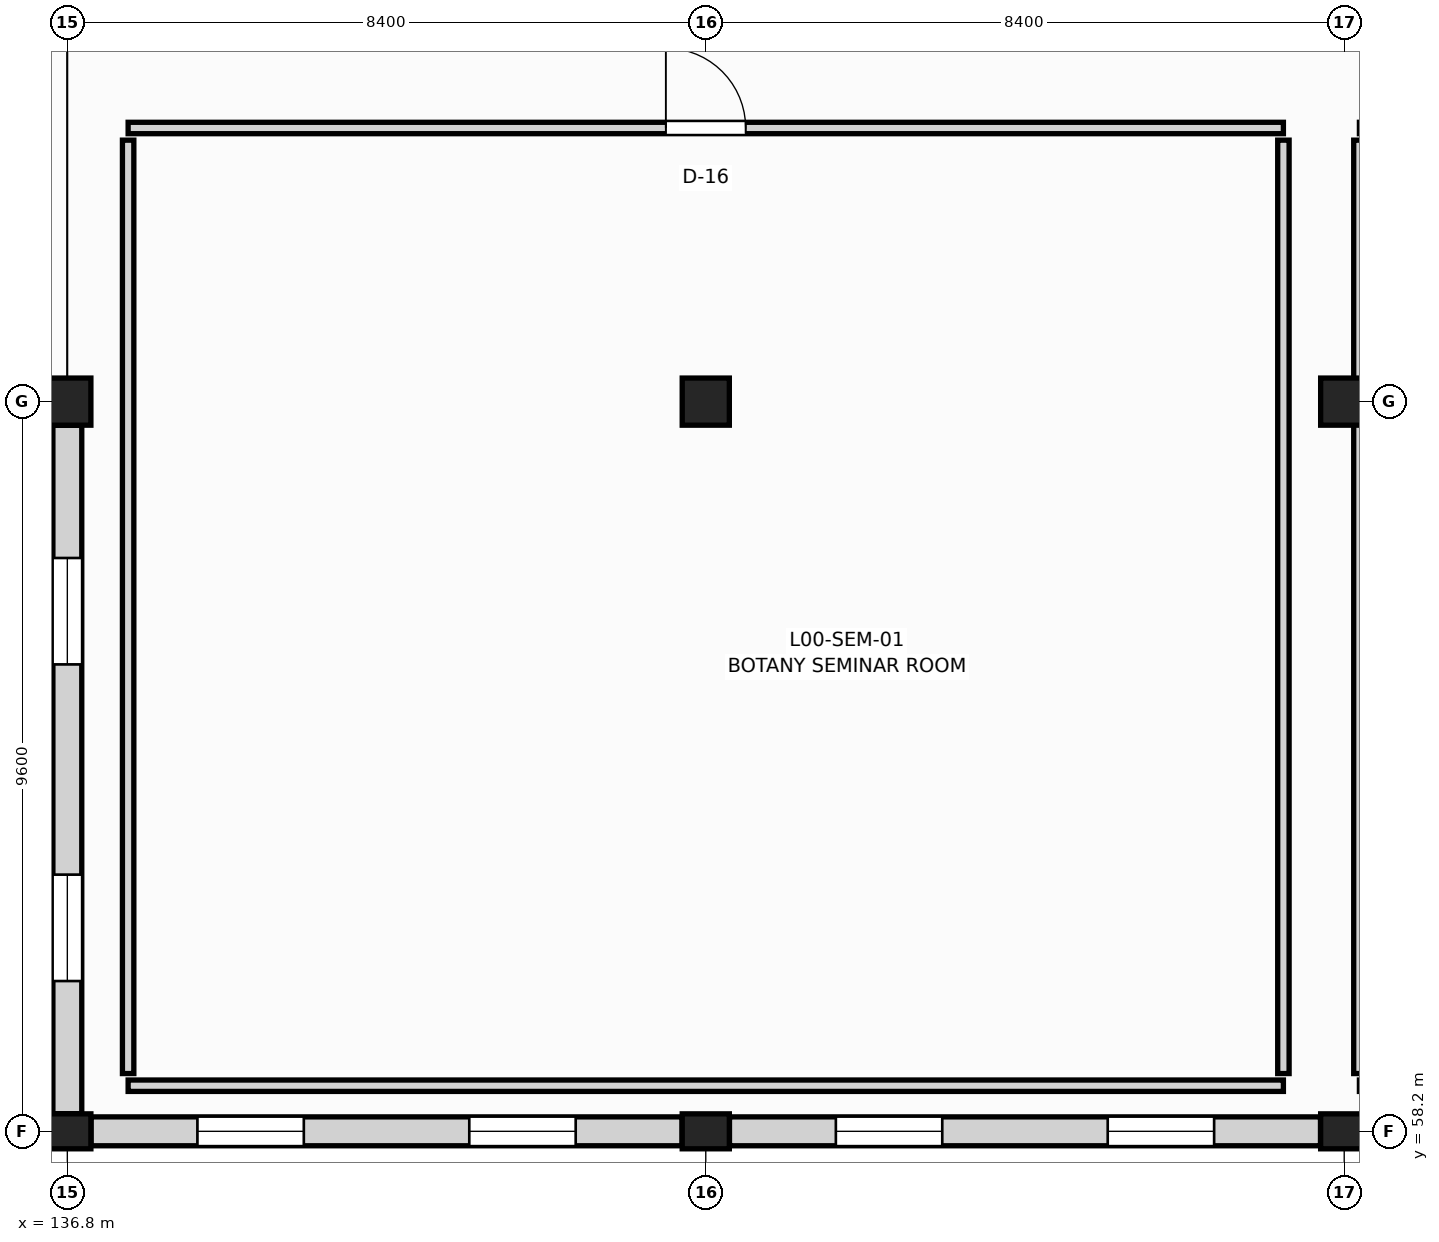
"""IFC4 building model, lengths in metres.
Left out: names, types, materials, properties, quantities, classifications, styles, units other than length and angle.
Written with IfcOpenShell. Run it as: python <this file> out.ifc"""

import sys

from ifc_helpers import new_model, si_unit, direction, frame, frame_2d, origin, origin_2d, place, context, subcontext, project, spatial, rectangle, extrude, element, fill, save


model = new_model("IFC4")
c1 = context("Model", 3, precision=1e-05, world=origin(), true_north=direction((0.0, 1.0)))
c2 = subcontext(c1, "Body", "Model", "MODEL_VIEW")
j1 = project(units=[si_unit("LENGTHUNIT", "METRE"), si_unit("PLANEANGLEUNIT", "RADIAN")], contexts=[c1])
p1 = place(None, origin())
s1 = spatial("IfcSite", under=j1, at=p1, CompositionType="ELEMENT")
p2 = place(p1, origin())
s2 = spatial("IfcBuilding", under=s1, at=p2, CompositionType="ELEMENT")
p3 = place(p2, origin())
s3 = spatial("IfcBuildingStorey", under=s2, at=p3, CompositionType="ELEMENT", Elevation=0.0)
p4 = place(p3, frame((136.8, 58.2, 0.0), z_axis=(0.0, 0.0, 1.0), x_axis=(1.0, 0.0, 0.0)))
e1 = element("IfcColumn", 1, at=p4, inside=s3, PredefinedType="COLUMN", context=c2, shape_type="SweptSolid", body=[
    extrude(rectangle(XDim=0.62, YDim=0.46, at=origin_2d()), origin(), (0.0, 0.0, 1.0), 5.08),
])
p5 = place(p3, frame((136.8, 67.8, 0.0), z_axis=(0.0, 0.0, 1.0), x_axis=(1.0, 0.0, 0.0)))
e2 = element("IfcColumn", 2, at=p5, inside=s3, PredefinedType="COLUMN", context=c2, shape_type="SweptSolid", body=[
    extrude(rectangle(XDim=0.62, YDim=0.62, at=origin_2d()), origin(), (0.0, 0.0, 1.0), 5.08),
])
p6 = place(p3, frame((145.2, 58.2, 0.0), z_axis=(0.0, 0.0, 1.0), x_axis=(1.0, 0.0, 0.0)))
e3 = element("IfcColumn", 3, at=p6, inside=s3, PredefinedType="COLUMN", context=c2, shape_type="SweptSolid", body=[
    extrude(rectangle(XDim=0.62, YDim=0.46, at=origin_2d()), origin(), (0.0, 0.0, 1.0), 5.08),
])
p7 = place(p3, frame((145.2, 67.8, 0.0), z_axis=(0.0, 0.0, 1.0), x_axis=(1.0, 0.0, 0.0)))
e4 = element("IfcColumn", 4, at=p7, inside=s3, PredefinedType="COLUMN", context=c2, shape_type="SweptSolid", body=[
    extrude(rectangle(XDim=0.62, YDim=0.62, at=origin_2d()), origin(), (0.0, 0.0, 1.0), 5.08),
])
p8 = place(p3, frame((153.6, 58.2, 0.0), z_axis=(0.0, 0.0, 1.0), x_axis=(1.0, 0.0, 0.0)))
e5 = element("IfcColumn", 5, at=p8, inside=s3, PredefinedType="COLUMN", context=c2, shape_type="SweptSolid", body=[
    extrude(rectangle(XDim=0.62, YDim=0.46, at=origin_2d()), origin(), (0.0, 0.0, 1.0), 5.08),
])
p9 = place(p3, frame((153.6, 67.8, 0.0), z_axis=(0.0, 0.0, 1.0), x_axis=(1.0, 0.0, 0.0)))
e6 = element("IfcColumn", 6, at=p9, inside=s3, PredefinedType="COLUMN", context=c2, shape_type="SweptSolid", body=[
    extrude(rectangle(XDim=0.62, YDim=0.62, at=origin_2d()), origin(), (0.0, 0.0, 1.0), 5.08),
])
p10 = place(p3, frame((137.112, 58.2, 0.0), z_axis=(0.0, 0.0, 1.0), x_axis=(1.0, 0.0, 0.0)))
e7 = element("IfcWall", 7, at=p10, inside=s3, PredefinedType="SOLIDWALL", context=c2, shape_type="SweptSolid", body=[
    extrude(rectangle(XDim=7.776, YDim=0.38, at=frame_2d((3.888, 0.0))), origin(), (0.0, 0.0, 1.0), 4.28),
])
p11 = place(p10, frame((1.399, 0.0, 0.85)))
e8 = element("IfcOpeningElement", 8, at=p11, cuts=e7, PredefinedType="OPENING", context=c2, shape_type="SweptSolid", body=[
    extrude(rectangle(XDim=1.4, YDim=1.65, at=frame_2d((0.7, 0.825))), frame((0.0, 0.2, 0.0), z_axis=(0.0, -1.0, 0.0), x_axis=(1.0, 0.0, 0.0)), (0.0, 0.0, 1.0), 0.4),
])
p12 = place(p10, frame((4.977, 0.0, 0.85)))
e9 = element("IfcOpeningElement", 9, at=p12, cuts=e7, PredefinedType="OPENING", context=c2, shape_type="SweptSolid", body=[
    extrude(rectangle(XDim=1.4, YDim=1.65, at=frame_2d((0.7, 0.825))), frame((0.0, 0.2, 0.0), z_axis=(0.0, -1.0, 0.0), x_axis=(1.0, 0.0, 0.0)), (0.0, 0.0, 1.0), 0.4),
])
p13 = place(p3, frame((145.512, 58.2, 0.0), z_axis=(0.0, 0.0, 1.0), x_axis=(1.0, 0.0, 0.0)))
e10 = element("IfcWall", 10, at=p13, inside=s3, PredefinedType="SOLIDWALL", context=c2, shape_type="SweptSolid", body=[
    extrude(rectangle(XDim=7.776, YDim=0.38, at=frame_2d((3.888, 0.0))), origin(), (0.0, 0.0, 1.0), 4.28),
])
p14 = place(p13, frame((1.399, 0.0, 0.85)))
e11 = element("IfcOpeningElement", 11, at=p14, cuts=e10, PredefinedType="OPENING", context=c2, shape_type="SweptSolid", body=[
    extrude(rectangle(XDim=1.4, YDim=1.65, at=frame_2d((0.7, 0.825))), frame((0.0, 0.2, 0.0), z_axis=(0.0, -1.0, 0.0), x_axis=(1.0, 0.0, 0.0)), (0.0, 0.0, 1.0), 0.4),
])
p15 = place(p13, frame((4.977, 0.0, 0.85)))
e12 = element("IfcOpeningElement", 12, at=p15, cuts=e10, PredefinedType="OPENING", context=c2, shape_type="SweptSolid", body=[
    extrude(rectangle(XDim=1.4, YDim=1.65, at=frame_2d((0.7, 0.825))), frame((0.0, 0.2, 0.0), z_axis=(0.0, -1.0, 0.0), x_axis=(1.0, 0.0, 0.0)), (0.0, 0.0, 1.0), 0.4),
])
p16 = place(p3, frame((136.8, 58.432, 0.0), z_axis=(0.0, 0.0, 1.0), x_axis=(0.0, 1.0, 0.0)))
e13 = element("IfcWall", 13, at=p16, inside=s3, PredefinedType="SOLIDWALL", context=c2, shape_type="SweptSolid", body=[
    extrude(rectangle(XDim=9.056, YDim=0.38, at=frame_2d((4.528, 0.0))), origin(), (0.0, 0.0, 1.0), 4.28),
])
p17 = place(p16, frame((1.745, 0.0, 0.85)))
e14 = element("IfcOpeningElement", 14, at=p17, cuts=e13, PredefinedType="OPENING", context=c2, shape_type="SweptSolid", body=[
    extrude(rectangle(XDim=1.4, YDim=1.65, at=frame_2d((0.7, 0.825))), frame((0.0, 0.2, 0.0), z_axis=(0.0, -1.0, 0.0), x_axis=(1.0, 0.0, 0.0)), (0.0, 0.0, 1.0), 0.4),
])
p18 = place(p16, frame((5.911, 0.0, 0.85)))
e15 = element("IfcOpeningElement", 15, at=p18, cuts=e13, PredefinedType="OPENING", context=c2, shape_type="SweptSolid", body=[
    extrude(rectangle(XDim=1.4, YDim=1.65, at=frame_2d((0.7, 0.825))), frame((0.0, 0.2, 0.0), z_axis=(0.0, -1.0, 0.0), x_axis=(1.0, 0.0, 0.0)), (0.0, 0.0, 1.0), 0.4),
])
p19 = place(p3, frame((137.6, 58.8, 0.0), z_axis=(0.0, 0.0, 1.0), x_axis=(1.0, 0.0, 0.0)))
e16 = element("IfcWall", 16, at=p19, inside=s3, PredefinedType="PARTITIONING", context=c2, shape_type="SweptSolid", body=[
    extrude(rectangle(XDim=15.2, YDim=0.15, at=frame_2d((7.6, 0.0))), origin(), (0.0, 0.0, 1.0), 4.12),
])
p20 = place(p3, frame((137.6, 71.4, 0.0), z_axis=(0.0, 0.0, 1.0), x_axis=(1.0, 0.0, 0.0)))
e17 = element("IfcWall", 17, at=p20, inside=s3, PredefinedType="PARTITIONING", context=c2, shape_type="SweptSolid", body=[
    extrude(rectangle(XDim=15.2, YDim=0.15, at=frame_2d((7.6, 0.0))), origin(), (0.0, 0.0, 1.0), 4.12),
])
p21 = place(p20, frame((7.075, 0.0, 0.0)))
e18 = element("IfcOpeningElement", 18, at=p21, cuts=e17, PredefinedType="OPENING", context=c2, shape_type="SweptSolid", body=[
    extrude(rectangle(XDim=1.05, YDim=2.2, at=frame_2d((0.525, 1.1))), frame((0.0, 0.085, 0.0), z_axis=(0.0, -1.0, 0.0), x_axis=(1.0, 0.0, 0.0)), (0.0, 0.0, 1.0), 0.17),
])
for number, where, z_axis, x_axis in (
    (19, (137.6, 58.96, 0.0), (0.0, 0.0, 1.0), (0.0, 1.0, 0.0)),
    (20, (152.8, 58.96, 0.0), (0.0, 0.0, 1.0), (0.0, 1.0, 0.0)),
):
    element("IfcWall", number, at=place(p3, frame(where, z_axis=z_axis, x_axis=x_axis)), inside=s3, PredefinedType="PARTITIONING", context=c2, shape_type="SweptSolid", body=[
        extrude(rectangle(XDim=12.28, YDim=0.15, at=frame_2d((6.14, 0.0))), origin(), (0.0, 0.0, 1.0), 4.12),
    ])
p22 = place(p3, frame((153.8, 58.8, 0.0), z_axis=(0.0, 0.0, 1.0), x_axis=(1.0, 0.0, 0.0)))
e21 = element("IfcWall", 21, at=p22, inside=s3, PredefinedType="PARTITIONING", context=c2, shape_type="SweptSolid", body=[
    extrude(rectangle(XDim=15.8, YDim=0.15, at=frame_2d((7.9, 0.0))), origin(), (0.0, 0.0, 1.0), 4.12),
])
p23 = place(p3, frame((153.8, 71.4, 0.0), z_axis=(0.0, 0.0, 1.0), x_axis=(1.0, 0.0, 0.0)))
e22 = element("IfcWall", 22, at=p23, inside=s3, PredefinedType="PARTITIONING", context=c2, shape_type="SweptSolid", body=[
    extrude(rectangle(XDim=15.8, YDim=0.15, at=frame_2d((7.9, 0.0))), origin(), (0.0, 0.0, 1.0), 4.12),
])
p24 = place(p23, frame((7.375, 0.0, 0.0)))
e23 = element("IfcOpeningElement", 23, at=p24, cuts=e22, PredefinedType="OPENING", context=c2, shape_type="SweptSolid", body=[
    extrude(rectangle(XDim=1.05, YDim=2.2, at=frame_2d((0.525, 1.1))), frame((0.0, 0.085, 0.0), z_axis=(0.0, -1.0, 0.0), x_axis=(1.0, 0.0, 0.0)), (0.0, 0.0, 1.0), 0.17),
])
p25 = place(p3, frame((153.8, 58.96, 0.0), z_axis=(0.0, 0.0, 1.0), x_axis=(0.0, 1.0, 0.0)))
e24 = element("IfcWall", 24, at=p25, inside=s3, PredefinedType="PARTITIONING", context=c2, shape_type="SweptSolid", body=[
    extrude(rectangle(XDim=12.28, YDim=0.15, at=frame_2d((6.14, 0.0))), origin(), (0.0, 0.0, 1.0), 4.12),
])
p26 = place(p11, origin())
e25 = element("IfcWindow", 25, at=p26, inside=s3, PartitioningType="SINGLE_PANEL", PredefinedType="WINDOW", context=c2, shape_type="SweptSolid", body=[
    extrude(rectangle(XDim=1.4, YDim=1.65, at=frame_2d((0.7, 0.825))), frame((0.0, 0.03, 0.0), z_axis=(0.0, -1.0, 0.0), x_axis=(1.0, 0.0, 0.0)), (0.0, 0.0, 1.0), 0.06),
])
fill(e8, e25)
p27 = place(p12, origin())
e26 = element("IfcWindow", 26, at=p27, inside=s3, PartitioningType="SINGLE_PANEL", PredefinedType="WINDOW", context=c2, shape_type="SweptSolid", body=[
    extrude(rectangle(XDim=1.4, YDim=1.65, at=frame_2d((0.7, 0.825))), frame((0.0, 0.03, 0.0), z_axis=(0.0, -1.0, 0.0), x_axis=(1.0, 0.0, 0.0)), (0.0, 0.0, 1.0), 0.06),
])
fill(e9, e26)
p28 = place(p14, origin())
e27 = element("IfcWindow", 27, at=p28, inside=s3, PartitioningType="SINGLE_PANEL", PredefinedType="WINDOW", context=c2, shape_type="SweptSolid", body=[
    extrude(rectangle(XDim=1.4, YDim=1.65, at=frame_2d((0.7, 0.825))), frame((0.0, 0.03, 0.0), z_axis=(0.0, -1.0, 0.0), x_axis=(1.0, 0.0, 0.0)), (0.0, 0.0, 1.0), 0.06),
])
fill(e11, e27)
p29 = place(p15, origin())
e28 = element("IfcWindow", 28, at=p29, inside=s3, PartitioningType="SINGLE_PANEL", PredefinedType="WINDOW", context=c2, shape_type="SweptSolid", body=[
    extrude(rectangle(XDim=1.4, YDim=1.65, at=frame_2d((0.7, 0.825))), frame((0.0, 0.03, 0.0), z_axis=(0.0, -1.0, 0.0), x_axis=(1.0, 0.0, 0.0)), (0.0, 0.0, 1.0), 0.06),
])
fill(e12, e28)
p30 = place(p17, origin())
e29 = element("IfcWindow", 29, at=p30, inside=s3, PartitioningType="SINGLE_PANEL", PredefinedType="WINDOW", context=c2, shape_type="SweptSolid", body=[
    extrude(rectangle(XDim=1.4, YDim=1.65, at=frame_2d((0.7, 0.825))), frame((0.0, 0.03, 0.0), z_axis=(0.0, -1.0, 0.0), x_axis=(1.0, 0.0, 0.0)), (0.0, 0.0, 1.0), 0.06),
])
fill(e14, e29)
p31 = place(p18, origin())
e30 = element("IfcWindow", 30, at=p31, inside=s3, PartitioningType="SINGLE_PANEL", PredefinedType="WINDOW", context=c2, shape_type="SweptSolid", body=[
    extrude(rectangle(XDim=1.4, YDim=1.65, at=frame_2d((0.7, 0.825))), frame((0.0, 0.03, 0.0), z_axis=(0.0, -1.0, 0.0), x_axis=(1.0, 0.0, 0.0)), (0.0, 0.0, 1.0), 0.06),
])
fill(e15, e30)
p32 = place(p21, origin())
e31 = element("IfcDoor", 31, at=p32, inside=s3, OperationType="SINGLE_SWING_LEFT", PredefinedType="DOOR", context=c2, shape_type="SweptSolid", body=[
    extrude(rectangle(XDim=1.05, YDim=2.2, at=frame_2d((0.525, 1.1))), frame((0.0, 0.025, 0.0), z_axis=(0.0, -1.0, 0.0), x_axis=(1.0, 0.0, 0.0)), (0.0, 0.0, 1.0), 0.05),
])
fill(e18, e31)
save(model, sys.argv[1])
